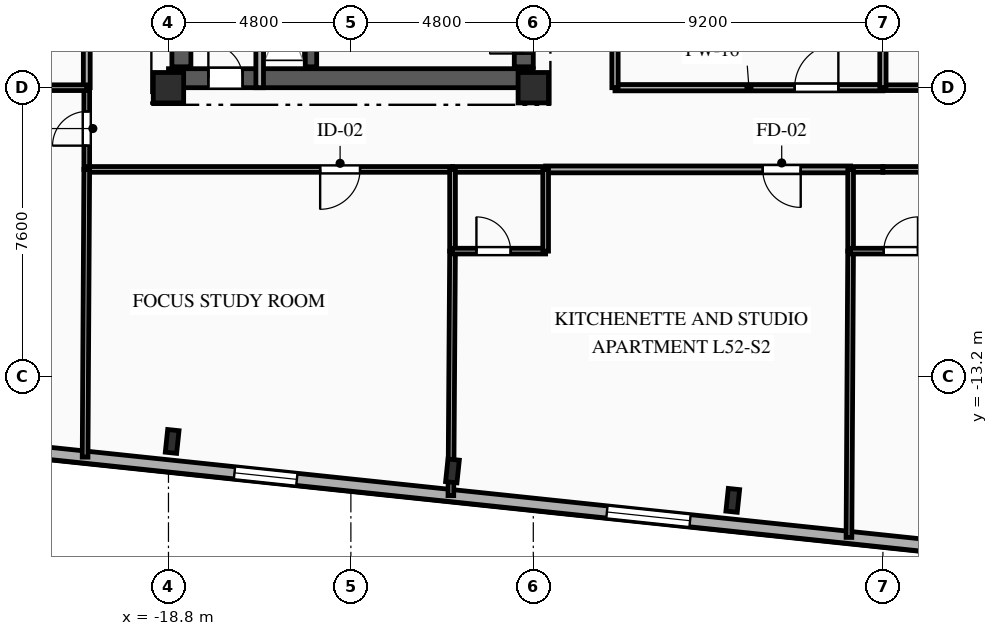
"""IFC4 building model, lengths in metres.
Left out: names, types, materials, properties, quantities, classifications, styles, units other than length and angle.
Written with IfcOpenShell. Run it as: python <this file> out.ifc"""

import sys

from ifc_helpers import new_model, si_unit, direction, frame, frame_2d, origin, origin_2d, place, context, subcontext, project, spatial, rectangle, i_section, extrude, element, fill, save


model = new_model("IFC4")
c1 = context("Model", 3, precision=1e-05, world=origin(), true_north=direction((0.0, 1.0)))
c2 = subcontext(c1, "Body", "Model", "MODEL_VIEW")
j1 = project(units=[si_unit("LENGTHUNIT", "METRE"), si_unit("PLANEANGLEUNIT", "RADIAN")], contexts=[c1])
p1 = place(None, origin())
s1 = spatial("IfcSite", under=j1, at=p1, CompositionType="ELEMENT")
p2 = place(p1, origin())
s2 = spatial("IfcBuilding", under=s1, at=p2, CompositionType="ELEMENT")
p3 = place(p2, frame((0.0, 0.0, 186.35)))
s3 = spatial("IfcBuildingStorey", under=s2, at=p3, CompositionType="ELEMENT", Elevation=186.35)
for number, where, z_axis, x_axis in (
    (1, (-18.8, -5.6, 0.0), (0.0, 0.0, 1.0), (1.0, 0.0, 0.0)),
    (2, (-9.2, -5.6, 0.0), (0.0, 0.0, 1.0), (1.0, 0.0, 0.0)),
):
    element("IfcColumn", number, at=place(p3, frame(where, z_axis=z_axis, x_axis=x_axis)), inside=s3, PredefinedType="COLUMN", context=c2, shape_type="SweptSolid", body=[
        extrude(rectangle(XDim=0.8, YDim=0.8, at=origin_2d()), origin(), (0.0, 0.0, 1.0), 3.35),
    ])
for number, where, z_axis, x_axis in (
    (3, (-18.703, -14.908, 0.0), (0.0, 0.0, 1.0), (0.995, -0.105, 0.0)),
    (4, (-11.327, -15.683, 0.0), (0.0, 0.0, 1.0), (0.995, -0.105, 0.0)),
    (5, (-3.951, -16.458, 0.0), (0.0, 0.0, 1.0), (0.995, -0.105, 0.0)),
):
    element("IfcColumn", number, at=place(p3, frame(where, z_axis=z_axis, x_axis=x_axis)), inside=s3, PredefinedType="COLUMN", context=c2, shape_type="SweptSolid", body=[
        extrude(i_section(OverallWidth=0.3, OverallDepth=0.6, WebThickness=0.015, FlangeThickness=0.03, FilletRadius=0.027, at=origin_2d()), origin(), (0.0, 0.0, 1.0), 3.35),
    ])
p4 = place(p3, frame((18.756, -19.498, 0.0), z_axis=(0.0, 0.0, 1.0), x_axis=(-0.994522060044, 0.104526896475, 0.0)))
e6 = element("IfcWall", 6, at=p4, inside=s3, PredefinedType="SOLIDWALL", context=c2, shape_type="SweptSolid", body=[
    extrude(rectangle(XDim=45.8, YDim=0.32, at=frame_2d((22.9, 0.0))), origin(), (0.0, 0.0, 1.0), 3.04),
])
p5 = place(p4, frame((1.217, 0.0, 0.85)))
e7 = element("IfcOpeningElement", 7, at=p5, cuts=e6, PredefinedType="OPENING", context=c2, shape_type="SweptSolid", body=[
    extrude(rectangle(XDim=1.65, YDim=1.85, at=frame_2d((0.825, 0.925))), frame((0.0, 0.17, 0.0), z_axis=(0.0, -1.0, 0.0), x_axis=(1.0, 0.0, 0.0)), (0.0, 0.0, 1.0), 0.34),
])
p6 = place(p4, frame((5.621, 0.0, 0.85)))
e8 = element("IfcOpeningElement", 8, at=p6, cuts=e6, PredefinedType="OPENING", context=c2, shape_type="SweptSolid", body=[
    extrude(rectangle(XDim=1.65, YDim=1.85, at=frame_2d((0.825, 0.925))), frame((0.0, 0.17, 0.0), z_axis=(0.0, -1.0, 0.0), x_axis=(1.0, 0.0, 0.0)), (0.0, 0.0, 1.0), 0.34),
])
p7 = place(p4, frame((13.433, 0.0, 0.85)))
e9 = element("IfcOpeningElement", 9, at=p7, cuts=e6, PredefinedType="OPENING", context=c2, shape_type="SweptSolid", body=[
    extrude(rectangle(XDim=2.2, YDim=1.85, at=frame_2d((1.1, 0.925))), frame((0.0, 0.17, 0.0), z_axis=(0.0, -1.0, 0.0), x_axis=(1.0, 0.0, 0.0)), (0.0, 0.0, 1.0), 0.34),
])
p8 = place(p4, frame((23.962, 0.0, 0.85)))
e10 = element("IfcOpeningElement", 10, at=p8, cuts=e6, PredefinedType="OPENING", context=c2, shape_type="SweptSolid", body=[
    extrude(rectangle(XDim=2.2, YDim=1.85, at=frame_2d((1.1, 0.925))), frame((0.0, 0.17, 0.0), z_axis=(0.0, -1.0, 0.0), x_axis=(1.0, 0.0, 0.0)), (0.0, 0.0, 1.0), 0.34),
])
p9 = place(p4, frame((34.366, 0.0, 0.85)))
e11 = element("IfcOpeningElement", 11, at=p9, cuts=e6, PredefinedType="OPENING", context=c2, shape_type="SweptSolid", body=[
    extrude(rectangle(XDim=1.65, YDim=1.85, at=frame_2d((0.825, 0.925))), frame((0.0, 0.17, 0.0), z_axis=(0.0, -1.0, 0.0), x_axis=(1.0, 0.0, 0.0)), (0.0, 0.0, 1.0), 0.34),
])
p10 = place(p4, frame((41.892, 0.0, 0.85)))
e12 = element("IfcOpeningElement", 12, at=p10, cuts=e6, PredefinedType="OPENING", context=c2, shape_type="SweptSolid", body=[
    extrude(rectangle(XDim=1.65, YDim=1.85, at=frame_2d((0.825, 0.925))), frame((0.0, 0.17, 0.0), z_axis=(0.0, -1.0, 0.0), x_axis=(1.0, 0.0, 0.0)), (0.0, 0.0, 1.0), 0.34),
])
p11 = place(p3, frame((-18.8, -5.35, 0.0), z_axis=(0.0, 0.0, 1.0), x_axis=(1.0, 0.0, 0.0)))
e13 = element("IfcWall", 13, at=p11, inside=s3, PredefinedType="SHEAR", context=c2, shape_type="SweptSolid", body=[
    extrude(rectangle(XDim=9.6, YDim=0.5, at=frame_2d((4.8, 0.0))), origin(), (0.0, 0.0, 1.0), 3.04),
])
p12 = place(p11, frame((1.05, 0.0, 0.0)))
e14 = element("IfcOpeningElement", 14, at=p12, cuts=e13, PredefinedType="OPENING", context=c2, shape_type="SweptSolid", body=[
    extrude(rectangle(XDim=0.9, YDim=2.1, at=frame_2d((0.45, 1.05))), frame((0.0, 0.26, 0.0), z_axis=(0.0, -1.0, 0.0), x_axis=(1.0, 0.0, 0.0)), (0.0, 0.0, 1.0), 0.52),
])
p13 = place(p3, frame((-18.46, -5.05, 0.0), z_axis=(0.0, 0.0, 1.0), x_axis=(0.0, 1.0, 0.0)))
e15 = element("IfcWall", 15, at=p13, inside=s3, PredefinedType="SHEAR", context=c2, shape_type="SweptSolid", body=[
    extrude(rectangle(XDim=10.1, YDim=0.5, at=frame_2d((5.05, 0.0))), origin(), (0.0, 0.0, 1.0), 3.04),
])
p14 = place(p3, frame((-9.45, -5.05, 0.0), z_axis=(0.0, 0.0, 1.0), x_axis=(0.0, 1.0, 0.0)))
e16 = element("IfcWall", 16, at=p14, inside=s3, PredefinedType="SHEAR", context=c2, shape_type="SweptSolid", body=[
    extrude(rectangle(XDim=10.1, YDim=0.5, at=frame_2d((5.05, 0.0))), origin(), (0.0, 0.0, 1.0), 3.04),
])
p15 = place(p14, frame((7.175, 0.0, 0.0)))
e17 = element("IfcOpeningElement", 17, at=p15, cuts=e16, PredefinedType="OPENING", context=c2, shape_type="SweptSolid", body=[
    extrude(rectangle(XDim=0.9, YDim=2.1, at=frame_2d((0.45, 1.05))), frame((0.0, 0.26, 0.0), z_axis=(0.0, -1.0, 0.0), x_axis=(1.0, 0.0, 0.0)), (0.0, 0.0, 1.0), 0.52),
])
p16 = place(p14, frame((2.4, 0.0, 0.0)))
e18 = element("IfcOpeningElement", 18, at=p16, cuts=e16, PredefinedType="OPENING", context=c2, shape_type="SweptSolid", body=[
    extrude(rectangle(XDim=1.2, YDim=2.15, at=frame_2d((0.6, 1.075))), frame((0.0, 0.26, 0.0), z_axis=(0.0, -1.0, 0.0), x_axis=(1.0, 0.0, 0.0)), (0.0, 0.0, 1.0), 0.52),
])
p17 = place(p14, frame((0.35, 0.0, 0.0)))
e19 = element("IfcOpeningElement", 19, at=p17, cuts=e16, PredefinedType="OPENING", context=c2, shape_type="SweptSolid", body=[
    extrude(rectangle(XDim=0.9, YDim=2.1, at=frame_2d((0.45, 1.05))), frame((0.0, 0.26, 0.0), z_axis=(0.0, -1.0, 0.0), x_axis=(1.0, 0.0, 0.0)), (0.0, 0.0, 1.0), 0.52),
])
p18 = place(p14, frame((5.0, 0.0, 0.0)))
e20 = element("IfcOpeningElement", 20, at=p18, cuts=e16, PredefinedType="OPENING", context=c2, shape_type="SweptSolid", body=[
    extrude(rectangle(XDim=0.9, YDim=2.1, at=frame_2d((0.45, 1.05))), frame((0.0, 0.26, 0.0), z_axis=(0.0, -1.0, 0.0), x_axis=(1.0, 0.0, 0.0)), (0.0, 0.0, 1.0), 0.52),
])
p19 = place(p3, frame((-15.05, -5.05, 0.0), z_axis=(0.0, 0.0, 1.0), x_axis=(0.0, 1.0, 0.0)))
e21 = element("IfcWall", 21, at=p19, inside=s3, PredefinedType="SHEAR", context=c2, shape_type="SweptSolid", body=[
    extrude(rectangle(XDim=10.1, YDim=0.3, at=frame_2d((5.05, 0.0))), origin(), (0.0, 0.0, 1.0), 3.04),
])
p20 = place(p3, frame((-16.4, -5.6, 0.0), z_axis=(0.0, 0.0, 1.0), x_axis=(0.0, 1.0, 0.0)))
e22 = element("IfcWall", 22, at=p20, inside=s3, PredefinedType="PARTITIONING", context=c2, shape_type="SweptSolid", body=[
    extrude(rectangle(XDim=3.49, YDim=0.2, at=frame_2d((1.745, 0.0))), origin(), (0.0, 0.0, 1.0), 3.04),
])
p21 = place(p3, frame((-20.95, -7.75, 0.0), z_axis=(0.0, 0.0, 1.0), x_axis=(0.0, 1.0, 0.0)))
e23 = element("IfcWall", 23, at=p21, inside=s3, PredefinedType="PARTITIONING", context=c2, shape_type="SweptSolid", body=[
    extrude(rectangle(XDim=2.15, YDim=0.15, at=frame_2d((1.075, 0.0))), origin(), (0.0, 0.0, 1.0), 3.04),
])
p22 = place(p21, frame((0.625, 0.0, 0.0)))
e24 = element("IfcOpeningElement", 24, at=p22, cuts=e23, PredefinedType="OPENING", context=c2, shape_type="SweptSolid", body=[
    extrude(rectangle(XDim=0.9, YDim=2.1, at=frame_2d((0.45, 1.05))), frame((0.0, 0.085, 0.0), z_axis=(0.0, -1.0, 0.0), x_axis=(1.0, 0.0, 0.0)), (0.0, 0.0, 1.0), 0.17),
])
p23 = place(p3, frame((-11.325, -7.75, 0.0), z_axis=(0.0, 0.0, 1.0), x_axis=(-1.0, 0.0, 0.0)))
e25 = element("IfcWall", 25, at=p23, inside=s3, PredefinedType="PARTITIONING", context=c2, shape_type="SweptSolid", body=[
    extrude(rectangle(XDim=9.625, YDim=0.15, at=frame_2d((4.812, 0.0))), origin(), (0.0, 0.0, 1.0), 3.04),
])
p24 = place(p23, frame((2.434, 0.0, 0.0)))
e26 = element("IfcOpeningElement", 26, at=p24, cuts=e25, PredefinedType="OPENING", context=c2, shape_type="SweptSolid", body=[
    extrude(rectangle(XDim=1.05, YDim=2.15, at=frame_2d((0.525, 1.075))), frame((0.0, 0.085, 0.0), z_axis=(0.0, -1.0, 0.0), x_axis=(1.0, 0.0, 0.0)), (0.0, 0.0, 1.0), 0.17),
])
p25 = place(p3, frame((-0.85, -7.75, 0.0), z_axis=(0.0, 0.0, 1.0), x_axis=(-1.0, 0.0, 0.0)))
e27 = element("IfcWall", 27, at=p25, inside=s3, PredefinedType="PARTITIONING", context=c2, shape_type="SweptSolid", body=[
    extrude(rectangle(XDim=8.025, YDim=0.18, at=frame_2d((4.012, 0.0))), origin(), (0.0, 0.0, 1.0), 3.04),
])
p26 = place(p25, frame((1.313, 0.0, 0.0)))
e28 = element("IfcOpeningElement", 28, at=p26, cuts=e27, PredefinedType="OPENING", context=c2, shape_type="SweptSolid", body=[
    extrude(rectangle(XDim=1.0, YDim=2.15, at=frame_2d((0.5, 1.075))), frame((0.0, 0.1, 0.0), z_axis=(0.0, -1.0, 0.0), x_axis=(1.0, 0.0, 0.0)), (0.0, 0.0, 1.0), 0.2),
])
p27 = place(p3, frame((-8.875, -7.75, 0.0), z_axis=(0.0, 0.0, 1.0), x_axis=(-1.0, 0.0, 0.0)))
e29 = element("IfcWall", 29, at=p27, inside=s3, PredefinedType="PLUMBINGWALL", context=c2, shape_type="SweptSolid", body=[
    extrude(rectangle(XDim=2.45, YDim=0.15, at=frame_2d((1.225, 0.0))), origin(), (0.0, 0.0, 1.0), 3.04),
])
p28 = place(p3, frame((0.0, -7.75, 0.0), z_axis=(0.0, 0.0, 1.0), x_axis=(-1.0, 0.0, 0.0)))
e30 = element("IfcWall", 30, at=p28, inside=s3, PredefinedType="PLUMBINGWALL", context=c2, shape_type="SweptSolid", body=[
    extrude(rectangle(XDim=0.85, YDim=0.15, at=frame_2d((0.425, 0.0))), origin(), (0.0, 0.0, 1.0), 3.04),
])
p29 = place(p3, frame((-7.05, -5.6, 0.0), z_axis=(0.0, 0.0, 1.0), x_axis=(1.0, 0.0, 0.0)))
e31 = element("IfcWall", 31, at=p29, inside=s3, PredefinedType="PARTITIONING", context=c2, shape_type="SweptSolid", body=[
    extrude(rectangle(XDim=7.05, YDim=0.165, at=frame_2d((3.525, 0.0))), origin(), (0.0, 0.0, 1.0), 2.525),
])
p30 = place(p29, frame((4.728, 0.0, 0.0)))
e32 = element("IfcOpeningElement", 32, at=p30, cuts=e31, PredefinedType="OPENING", context=c2, shape_type="SweptSolid", body=[
    extrude(rectangle(XDim=1.15, YDim=2.15, at=frame_2d((0.575, 1.075))), frame((0.0, 0.093, 0.0), z_axis=(0.0, -1.0, 0.0), x_axis=(1.0, 0.0, 0.0)), (0.0, 0.0, 1.0), 0.185),
])
p31 = place(p3, frame((1.6, -7.75, 0.0), z_axis=(0.0, 0.0, 1.0), x_axis=(-1.0, 0.0, 0.0)))
e33 = element("IfcWall", 33, at=p31, inside=s3, PredefinedType="PLUMBINGWALL", context=c2, shape_type="SweptSolid", body=[
    extrude(rectangle(XDim=1.6, YDim=0.15, at=frame_2d((0.8, 0.0))), origin(), (0.0, 0.0, 1.0), 3.04),
])
p32 = place(p3, frame((0.0, -5.6, 0.0), z_axis=(0.0, 0.0, 1.0), x_axis=(1.0, 0.0, 0.0)))
e34 = element("IfcWall", 34, at=p32, inside=s3, PredefinedType="PARTITIONING", context=c2, shape_type="SweptSolid", body=[
    extrude(rectangle(XDim=7.05, YDim=0.15, at=frame_2d((3.525, 0.0))), origin(), (0.0, 0.0, 1.0), 2.525),
])
p33 = place(p32, frame((1.185, 0.0, 0.0)))
e35 = element("IfcOpeningElement", 35, at=p33, cuts=e34, PredefinedType="OPENING", context=c2, shape_type="SweptSolid", body=[
    extrude(rectangle(XDim=1.05, YDim=2.15, at=frame_2d((0.525, 1.075))), frame((0.0, 0.085, 0.0), z_axis=(0.0, -1.0, 0.0), x_axis=(1.0, 0.0, 0.0)), (0.0, 0.0, 1.0), 0.17),
])
p34 = place(p3, frame((-20.95, -5.6, 0.0), z_axis=(0.0, 0.0, 1.0), x_axis=(0.0, 1.0, 0.0)))
e36 = element("IfcWall", 36, at=p34, inside=s3, PredefinedType="PARTITIONING", context=c2, shape_type="SweptSolid", body=[
    extrude(rectangle(XDim=14.1, YDim=0.18, at=frame_2d((7.05, 0.0))), origin(), (0.0, 0.0, 1.0), 3.04),
])
p35 = place(p34, frame((5.058, 0.0, 0.0)))
e37 = element("IfcOpeningElement", 37, at=p35, cuts=e36, PredefinedType="OPENING", context=c2, shape_type="SweptSolid", body=[
    extrude(rectangle(XDim=1.0, YDim=2.15, at=frame_2d((0.5, 1.075))), frame((0.0, 0.1, 0.0), z_axis=(0.0, -1.0, 0.0), x_axis=(1.0, 0.0, 0.0)), (0.0, 0.0, 1.0), 0.2),
])
p36 = place(p3, frame((-7.05, -2.95, 0.0), z_axis=(0.0, 0.0, 1.0), x_axis=(0.0, -1.0, 0.0)))
e38 = element("IfcWall", 38, at=p36, inside=s3, PredefinedType="PARTITIONING", context=c2, shape_type="SweptSolid", body=[
    extrude(rectangle(XDim=2.65, YDim=0.165, at=frame_2d((1.325, 0.0))), origin(), (0.0, 0.0, 1.0), 3.04),
])
p37 = place(p3, frame((-20.95, -5.6, 0.0), z_axis=(0.0, 0.0, 1.0), x_axis=(-1.0, 0.0, 0.0)))
e39 = element("IfcWall", 39, at=p37, inside=s3, PredefinedType="PARTITIONING", context=c2, shape_type="SweptSolid", body=[
    extrude(rectangle(XDim=2.65, YDim=0.15, at=frame_2d((1.325, 0.0))), origin(), (0.0, 0.0, 1.0), 3.04),
])
p38 = place(p37, frame((0.965, 0.0, 0.0)))
e40 = element("IfcOpeningElement", 40, at=p38, cuts=e39, PredefinedType="OPENING", context=c2, shape_type="SweptSolid", body=[
    extrude(rectangle(XDim=1.05, YDim=2.15, at=frame_2d((0.525, 1.075))), frame((0.0, 0.085, 0.0), z_axis=(0.0, -1.0, 0.0), x_axis=(1.0, 0.0, 0.0)), (0.0, 0.0, 1.0), 0.17),
])
p39 = place(p3, frame((-20.95, -7.75, 0.0), z_axis=(0.0, 0.0, 1.0), x_axis=(-0.005804668564, -0.99998315277, 0.0)))
e41 = element("IfcWall", 41, at=p39, inside=s3, PredefinedType="PARTITIONING", context=c2, shape_type="SweptSolid", body=[
    extrude(rectangle(XDim=7.571, YDim=0.15, at=frame_2d((3.785, 0.0))), origin(), (0.0, 0.0, 1.0), 3.04),
])
p40 = place(p3, frame((-11.325, -9.9, 0.0), z_axis=(0.0, 0.0, 1.0), x_axis=(-0.006831737937, -0.999976663406, 0.0)))
e42 = element("IfcWall", 42, at=p40, inside=s3, PredefinedType="PARTITIONING", context=c2, shape_type="SweptSolid", body=[
    extrude(rectangle(XDim=6.433, YDim=0.15, at=frame_2d((3.216, 0.0))), origin(), (0.0, 0.0, 1.0), 2.665),
])
p41 = place(p3, frame((-11.325, -7.75, 0.0), z_axis=(0.0, 0.0, 1.0), x_axis=(0.0, -1.0, 0.0)))
e43 = element("IfcWall", 43, at=p41, inside=s3, PredefinedType="PLUMBINGWALL", context=c2, shape_type="SweptSolid", body=[
    extrude(rectangle(XDim=2.15, YDim=0.15, at=frame_2d((1.075, 0.0))), origin(), (0.0, 0.0, 1.0), 3.04),
])
p42 = place(p3, frame((-11.325, -9.9, 0.0), z_axis=(0.0, 0.0, 1.0), x_axis=(1.0, 0.0, 0.0)))
e44 = element("IfcWall", 44, at=p42, inside=s3, PredefinedType="PLUMBINGWALL", context=c2, shape_type="SweptSolid", body=[
    extrude(rectangle(XDim=2.45, YDim=0.15, at=frame_2d((1.225, 0.0))), origin(), (0.0, 0.0, 1.0), 3.04),
])
p43 = place(p42, frame((0.629, 0.0, 0.0)))
e45 = element("IfcOpeningElement", 45, at=p43, cuts=e44, PredefinedType="OPENING", context=c2, shape_type="SweptSolid", body=[
    extrude(rectangle(XDim=0.9, YDim=2.1, at=frame_2d((0.45, 1.05))), frame((0.0, 0.085, 0.0), z_axis=(0.0, -1.0, 0.0), x_axis=(1.0, 0.0, 0.0)), (0.0, 0.0, 1.0), 0.17),
])
p44 = place(p3, frame((-8.875, -9.9, 0.0), z_axis=(0.0, 0.0, 1.0), x_axis=(0.0, 1.0, 0.0)))
e46 = element("IfcWall", 46, at=p44, inside=s3, PredefinedType="PLUMBINGWALL", context=c2, shape_type="SweptSolid", body=[
    extrude(rectangle(XDim=2.15, YDim=0.15, at=frame_2d((1.075, 0.0))), origin(), (0.0, 0.0, 1.0), 3.04),
])
p45 = place(p3, frame((-0.85, -9.9, 0.0), z_axis=(0.0, 0.0, 1.0), x_axis=(-0.005801043172, -0.999983173807, 0.0)))
e47 = element("IfcWall", 47, at=p45, inside=s3, PredefinedType="PARTITIONING", context=c2, shape_type="SweptSolid", body=[
    extrude(rectangle(XDim=7.533, YDim=0.15, at=frame_2d((3.767, 0.0))), origin(), (0.0, 0.0, 1.0), 3.04),
])
p46 = place(p3, frame((-0.85, -7.75, 0.0), z_axis=(0.0, 0.0, 1.0), x_axis=(0.0, -1.0, 0.0)))
e48 = element("IfcWall", 48, at=p46, inside=s3, PredefinedType="PLUMBINGWALL", context=c2, shape_type="SweptSolid", body=[
    extrude(rectangle(XDim=2.15, YDim=0.15, at=frame_2d((1.075, 0.0))), origin(), (0.0, 0.0, 1.0), 3.04),
])
p47 = place(p3, frame((-0.85, -9.9, 0.0), z_axis=(0.0, 0.0, 1.0), x_axis=(1.0, 0.0, 0.0)))
e49 = element("IfcWall", 49, at=p47, inside=s3, PredefinedType="PLUMBINGWALL", context=c2, shape_type="SweptSolid", body=[
    extrude(rectangle(XDim=2.45, YDim=0.15, at=frame_2d((1.225, 0.0))), origin(), (0.0, 0.0, 1.0), 3.04),
])
p48 = place(p47, frame((0.873, 0.0, 0.0)))
e50 = element("IfcOpeningElement", 50, at=p48, cuts=e49, PredefinedType="OPENING", context=c2, shape_type="SweptSolid", body=[
    extrude(rectangle(XDim=0.9, YDim=2.1, at=frame_2d((0.45, 1.05))), frame((0.0, 0.085, 0.0), z_axis=(0.0, -1.0, 0.0), x_axis=(1.0, 0.0, 0.0)), (0.0, 0.0, 1.0), 0.17),
])
p49 = place(p3, frame((0.0, -2.95, 0.0), z_axis=(0.0, 0.0, 1.0), x_axis=(0.0, -1.0, 0.0)))
e51 = element("IfcWall", 51, at=p49, inside=s3, PredefinedType="PARTITIONING", context=c2, shape_type="SweptSolid", body=[
    extrude(rectangle(XDim=2.65, YDim=0.165, at=frame_2d((1.325, 0.0))), origin(), (0.0, 0.0, 1.0), 3.04),
])
p50 = place(p8, origin())
e52 = element("IfcWindow", 52, at=p50, inside=s3, PartitioningType="SINGLE_PANEL", PredefinedType="WINDOW", context=c2, shape_type="SweptSolid", body=[
    extrude(rectangle(XDim=2.2, YDim=1.85, at=frame_2d((1.1, 0.925))), frame((0.0, 0.03, 0.0), z_axis=(0.0, -1.0, 0.0), x_axis=(1.0, 0.0, 0.0)), (0.0, 0.0, 1.0), 0.06),
])
fill(e10, e52)
p51 = place(p9, origin())
e53 = element("IfcWindow", 53, at=p51, inside=s3, PartitioningType="SINGLE_PANEL", PredefinedType="WINDOW", context=c2, shape_type="SweptSolid", body=[
    extrude(rectangle(XDim=1.65, YDim=1.85, at=frame_2d((0.825, 0.925))), frame((0.0, 0.03, 0.0), z_axis=(0.0, -1.0, 0.0), x_axis=(1.0, 0.0, 0.0)), (0.0, 0.0, 1.0), 0.06),
])
fill(e11, e53)
p52 = place(p12, origin())
e54 = element("IfcDoor", 54, at=p52, inside=s3, OperationType="SINGLE_SWING_LEFT", PredefinedType="DOOR", context=c2, shape_type="SweptSolid", body=[
    extrude(rectangle(XDim=0.9, YDim=2.1, at=frame_2d((0.45, 1.05))), frame((0.0, 0.025, 0.0), z_axis=(0.0, -1.0, 0.0), x_axis=(1.0, 0.0, 0.0)), (0.0, 0.0, 1.0), 0.05),
])
fill(e14, e54)
p53 = place(p17, origin())
e55 = element("IfcDoor", 55, at=p53, inside=s3, OperationType="SINGLE_SWING_LEFT", PredefinedType="DOOR", context=c2, shape_type="SweptSolid", body=[
    extrude(rectangle(XDim=0.9, YDim=2.1, at=frame_2d((0.45, 1.05))), frame((0.0, 0.025, 0.0), z_axis=(0.0, -1.0, 0.0), x_axis=(1.0, 0.0, 0.0)), (0.0, 0.0, 1.0), 0.05),
])
fill(e19, e55)
p54 = place(p22, origin())
e56 = element("IfcDoor", 56, at=p54, inside=s3, OperationType="SINGLE_SWING_LEFT", PredefinedType="DOOR", context=c2, shape_type="SweptSolid", body=[
    extrude(rectangle(XDim=0.9, YDim=2.1, at=frame_2d((0.45, 1.05))), frame((0.0, 0.025, 0.0), z_axis=(0.0, -1.0, 0.0), x_axis=(1.0, 0.0, 0.0)), (0.0, 0.0, 1.0), 0.05),
])
fill(e24, e56)
p55 = place(p24, origin())
e57 = element("IfcDoor", 57, at=p55, inside=s3, OperationType="SINGLE_SWING_RIGHT", PredefinedType="DOOR", context=c2, shape_type="SweptSolid", body=[
    extrude(rectangle(XDim=1.05, YDim=2.15, at=frame_2d((0.525, 1.075))), frame((0.0, 0.025, 0.0), z_axis=(0.0, -1.0, 0.0), x_axis=(1.0, 0.0, 0.0)), (0.0, 0.0, 1.0), 0.05),
])
fill(e26, e57)
p56 = place(p26, origin())
e58 = element("IfcDoor", 58, at=p56, inside=s3, OperationType="SINGLE_SWING_LEFT", PredefinedType="DOOR", context=c2, shape_type="SweptSolid", body=[
    extrude(rectangle(XDim=1.0, YDim=2.15, at=frame_2d((0.5, 1.075))), frame((0.0, 0.025, 0.0), z_axis=(0.0, -1.0, 0.0), x_axis=(1.0, 0.0, 0.0)), (0.0, 0.0, 1.0), 0.05),
])
fill(e28, e58)
p57 = place(p30, origin())
e59 = element("IfcDoor", 59, at=p57, inside=s3, OperationType="SINGLE_SWING_RIGHT", PredefinedType="DOOR", context=c2, shape_type="SweptSolid", body=[
    extrude(rectangle(XDim=1.15, YDim=2.15, at=frame_2d((0.575, 1.075))), frame((0.0, 0.025, 0.0), z_axis=(0.0, -1.0, 0.0), x_axis=(1.0, 0.0, 0.0)), (0.0, 0.0, 1.0), 0.05),
])
fill(e32, e59)
p58 = place(p43, origin())
e60 = element("IfcDoor", 60, at=p58, inside=s3, OperationType="SINGLE_SWING_LEFT", PredefinedType="DOOR", context=c2, shape_type="SweptSolid", body=[
    extrude(rectangle(XDim=0.9, YDim=2.1, at=frame_2d((0.45, 1.05))), frame((0.0, 0.025, 0.0), z_axis=(0.0, -1.0, 0.0), x_axis=(1.0, 0.0, 0.0)), (0.0, 0.0, 1.0), 0.05),
])
fill(e45, e60)
p59 = place(p48, origin())
e61 = element("IfcDoor", 61, at=p59, inside=s3, OperationType="SINGLE_SWING_RIGHT", PredefinedType="DOOR", context=c2, shape_type="SweptSolid", body=[
    extrude(rectangle(XDim=0.9, YDim=2.1, at=frame_2d((0.45, 1.05))), frame((0.0, 0.025, 0.0), z_axis=(0.0, -1.0, 0.0), x_axis=(1.0, 0.0, 0.0)), (0.0, 0.0, 1.0), 0.05),
])
fill(e50, e61)
save(model, sys.argv[1])
